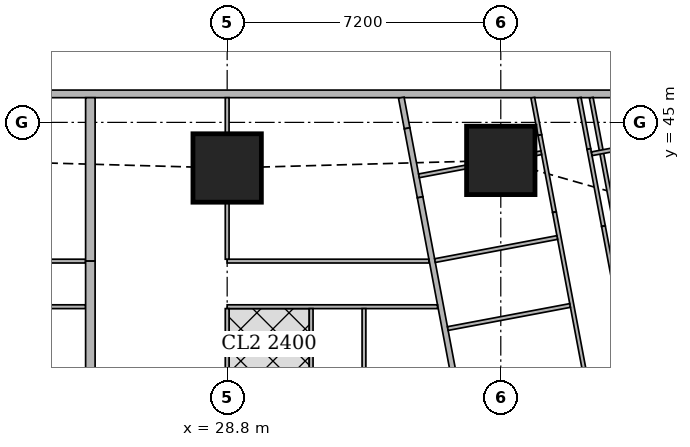
"""IFC4 building model, lengths in metres.
Left out: names, types, materials, properties, quantities, classifications, styles, units other than length and angle.
Written with IfcOpenShell. Run it as: python <this file> out.ifc"""

import sys

from ifc_helpers import new_model, si_unit, direction, frame, frame_2d, origin, origin_2d, place, context, subcontext, project, spatial, rectangle, extrude, element, fill, save


model = new_model("IFC4")
c1 = context("Model", 3, precision=1e-05, world=origin(), true_north=direction((0.0, 1.0)))
c2 = subcontext(c1, "Body", "Model", "MODEL_VIEW")
j1 = project(units=[si_unit("LENGTHUNIT", "METRE"), si_unit("PLANEANGLEUNIT", "RADIAN")], contexts=[c1])
p1 = place(None, origin())
s1 = spatial("IfcSite", under=j1, at=p1, CompositionType="ELEMENT")
p2 = place(p1, origin())
s2 = spatial("IfcBuilding", under=s1, at=p2, CompositionType="ELEMENT")
p3 = place(p2, frame((0.0, 0.0, 147.05)))
s3 = spatial("IfcBuildingStorey", under=s2, at=p3, CompositionType="ELEMENT", Elevation=147.05)
for number, where, z_axis, x_axis in (
    (1, (28.8, 43.8, 0.0), (0.0, 0.0, 1.0), (1.0, 0.0, 0.0)),
    (2, (36.0, 44.0, 0.0), (0.0, 0.0, 1.0), (1.0, 0.0, 0.0)),
):
    element("IfcColumn", number, at=place(p3, frame(where, z_axis=z_axis, x_axis=x_axis)), inside=s3, PredefinedType="COLUMN", context=c2, shape_type="SweptSolid", body=[
        extrude(rectangle(XDim=1.8, YDim=1.8, at=origin_2d()), origin(), (0.0, 0.0, 1.0), 3.75),
    ])
p4 = place(p3, frame((40.106, 45.75, 0.0), z_axis=(0.0, 0.0, 1.0), x_axis=(-1.0, 0.0, 0.0)))
e3 = element("IfcWall", 3, at=p4, inside=s3, PredefinedType="SOLIDWALL", context=c2, shape_type="SweptSolid", body=[
    extrude(rectangle(XDim=37.943, YDim=0.2, at=frame_2d((18.971, 0.0))), origin(), (0.0, 0.0, 1.0), 3.5),
])
p5 = place(p4, frame((8.606, 0.0, 0.9)))
e4 = element("IfcOpeningElement", 4, at=p5, cuts=e3, PredefinedType="OPENING", context=c2, shape_type="SweptSolid", body=[
    extrude(rectangle(XDim=1.8, YDim=1.5, at=frame_2d((0.9, 0.75))), frame((0.0, 0.11, 0.0), z_axis=(0.0, -1.0, 0.0), x_axis=(1.0, 0.0, 0.0)), (0.0, 0.0, 1.0), 0.22),
])
p6 = place(p4, frame((12.206, 0.0, 0.9)))
e5 = element("IfcOpeningElement", 5, at=p6, cuts=e3, PredefinedType="OPENING", context=c2, shape_type="SweptSolid", body=[
    extrude(rectangle(XDim=1.8, YDim=1.5, at=frame_2d((0.9, 0.75))), frame((0.0, 0.11, 0.0), z_axis=(0.0, -1.0, 0.0), x_axis=(1.0, 0.0, 0.0)), (0.0, 0.0, 1.0), 0.22),
])
p7 = place(p4, frame((15.806, 0.0, 0.9)))
e6 = element("IfcOpeningElement", 6, at=p7, cuts=e3, PredefinedType="OPENING", context=c2, shape_type="SweptSolid", body=[
    extrude(rectangle(XDim=1.8, YDim=1.5, at=frame_2d((0.9, 0.75))), frame((0.0, 0.11, 0.0), z_axis=(0.0, -1.0, 0.0), x_axis=(1.0, 0.0, 0.0)), (0.0, 0.0, 1.0), 0.22),
])
p8 = place(p4, frame((19.406, 0.0, 0.9)))
e7 = element("IfcOpeningElement", 7, at=p8, cuts=e3, PredefinedType="OPENING", context=c2, shape_type="SweptSolid", body=[
    extrude(rectangle(XDim=1.8, YDim=1.5, at=frame_2d((0.9, 0.75))), frame((0.0, 0.11, 0.0), z_axis=(0.0, -1.0, 0.0), x_axis=(1.0, 0.0, 0.0)), (0.0, 0.0, 1.0), 0.22),
])
p9 = place(p4, frame((23.006, 0.0, 0.9)))
e8 = element("IfcOpeningElement", 8, at=p9, cuts=e3, PredefinedType="OPENING", context=c2, shape_type="SweptSolid", body=[
    extrude(rectangle(XDim=1.8, YDim=1.5, at=frame_2d((0.9, 0.75))), frame((0.0, 0.11, 0.0), z_axis=(0.0, -1.0, 0.0), x_axis=(1.0, 0.0, 0.0)), (0.0, 0.0, 1.0), 0.22),
])
p10 = place(p4, frame((26.606, 0.0, 0.9)))
e9 = element("IfcOpeningElement", 9, at=p10, cuts=e3, PredefinedType="OPENING", context=c2, shape_type="SweptSolid", body=[
    extrude(rectangle(XDim=1.8, YDim=1.5, at=frame_2d((0.9, 0.75))), frame((0.0, 0.11, 0.0), z_axis=(0.0, -1.0, 0.0), x_axis=(1.0, 0.0, 0.0)), (0.0, 0.0, 1.0), 0.22),
])
p11 = place(p3, frame((33.382, 45.65, 0.0), z_axis=(0.0, 0.0, 1.0), x_axis=(0.185169202764, -0.982706653253, 0.0)))
e10 = element("IfcWall", 10, at=p11, inside=s3, PredefinedType="SOLIDWALL", context=c2, shape_type="SweptSolid", body=[
    extrude(rectangle(XDim=0.82, YDim=0.15, at=frame_2d((0.41, 0.0))), origin(), (0.0, 0.0, 1.0), 3.5),
])
p12 = place(p3, frame((33.534, 44.844, 0.0), z_axis=(0.0, 0.0, 1.0), x_axis=(0.185708872674, -0.982604811005, 0.0)))
e11 = element("IfcWall", 11, at=p12, inside=s3, PredefinedType="SOLIDWALL", context=c2, shape_type="SweptSolid", body=[
    extrude(rectangle(XDim=1.847, YDim=0.15, at=frame_2d((0.924, 0.0))), origin(), (0.0, 0.0, 1.0), 2.1),
])
p13 = place(p3, frame((33.877, 43.029, 0.0), z_axis=(0.0, 0.0, 1.0), x_axis=(0.185596841028, -0.98262597798, 0.0)))
e12 = element("IfcWall", 12, at=p13, inside=s3, PredefinedType="SOLIDWALL", context=c2, shape_type="SweptSolid", body=[
    extrude(rectangle(XDim=41.66, YDim=0.15, at=frame_2d((20.83, 0.0))), origin(), (0.0, 0.0, 1.0), 2.5),
])
p14 = place(p13, frame((12.57, 0.0, 0.0)))
e13 = element("IfcOpeningElement", 13, at=p14, cuts=e12, PredefinedType="OPENING", context=c2, shape_type="SweptSolid", body=[
    extrude(rectangle(XDim=1.0, YDim=2.1, at=frame_2d((0.5, 1.05))), frame((0.0, 0.085, 0.0), z_axis=(0.0, -1.0, 0.0), x_axis=(1.0, 0.0, 0.0)), (0.0, 0.0, 1.0), 0.17),
])
p15 = place(p13, frame((16.386, 0.0, 0.0)))
e14 = element("IfcOpeningElement", 14, at=p15, cuts=e12, PredefinedType="OPENING", context=c2, shape_type="SweptSolid", body=[
    extrude(rectangle(XDim=1.0, YDim=2.1, at=frame_2d((0.5, 1.05))), frame((0.0, 0.085, 0.0), z_axis=(0.0, -1.0, 0.0), x_axis=(1.0, 0.0, 0.0)), (0.0, 0.0, 1.0), 0.17),
])
p16 = place(p13, frame((31.166, 0.0, 0.0)))
e15 = element("IfcOpeningElement", 15, at=p16, cuts=e12, PredefinedType="OPENING", context=c2, shape_type="SweptSolid", body=[
    extrude(rectangle(XDim=1.0, YDim=2.1, at=frame_2d((0.5, 1.05))), frame((0.0, 0.085, 0.0), z_axis=(0.0, -1.0, 0.0), x_axis=(1.0, 0.0, 0.0)), (0.0, 0.0, 1.0), 0.17),
])
p17 = place(p3, frame((39.054, 42.085, 0.0), z_axis=(0.0, 0.0, 1.0), x_axis=(-0.185791584218, 0.982589175207, 0.0)))
e16 = element("IfcWall", 16, at=p17, inside=s3, PredefinedType="PARTITIONING", context=c2, shape_type="SweptSolid", body=[
    extrude(rectangle(XDim=3.628, YDim=0.1, at=frame_2d((1.814, 0.0))), origin(), (0.0, 0.0, 1.0), 2.1),
])
p18 = place(p3, frame((38.063, 45.65, 0.0), z_axis=(0.0, 0.0, 1.0), x_axis=(0.185456359766, -0.982652501458, 0.0)))
e17 = element("IfcWall", 17, at=p18, inside=s3, PredefinedType="PARTITIONING", context=c2, shape_type="SweptSolid", body=[
    extrude(rectangle(XDim=1.376, YDim=0.1, at=frame_2d((0.688, 0.0))), origin(), (0.0, 0.0, 1.0), 3.5),
])
p19 = place(p3, frame((38.318, 44.298, 0.0), z_axis=(0.0, 0.0, 1.0), x_axis=(0.185481135188, -0.982647825261, 0.0)))
e18 = element("IfcWall", 18, at=p19, inside=s3, PredefinedType="PARTITIONING", context=c2, shape_type="SweptSolid", body=[
    extrude(rectangle(XDim=2.064, YDim=0.1, at=frame_2d((1.032, 0.0))), origin(), (0.0, 0.0, 1.0), 2.1),
])
p20 = place(p3, frame((38.701, 42.27, 0.0), z_axis=(0.0, 0.0, 1.0), x_axis=(0.185634707842, -0.982618825, 0.0)))
e19 = element("IfcWall", 19, at=p20, inside=s3, PredefinedType="PARTITIONING", context=c2, shape_type="SweptSolid", body=[
    extrude(rectangle(XDim=9.47, YDim=0.1, at=frame_2d((4.735, 0.0))), origin(), (0.0, 0.0, 1.0), 3.5),
])
p21 = place(p20, frame((8.42, 0.0, 0.0)))
e20 = element("IfcOpeningElement", 20, at=p21, cuts=e19, PredefinedType="OPENING", context=c2, shape_type="SweptSolid", body=[
    extrude(rectangle(XDim=0.9, YDim=2.1, at=frame_2d((0.45, 1.05))), frame((0.0, 0.06, 0.0), z_axis=(0.0, -1.0, 0.0), x_axis=(1.0, 0.0, 0.0)), (0.0, 0.0, 1.0), 0.12),
])
p22 = place(p20, frame((4.444, 0.0, 0.0)))
e21 = element("IfcOpeningElement", 21, at=p22, cuts=e19, PredefinedType="OPENING", context=c2, shape_type="SweptSolid", body=[
    extrude(rectangle(XDim=0.9, YDim=2.1, at=frame_2d((0.45, 1.05))), frame((0.0, 0.06, 0.0), z_axis=(0.0, -1.0, 0.0), x_axis=(1.0, 0.0, 0.0)), (0.0, 0.0, 1.0), 0.12),
])
p23 = place(p3, frame((36.842, 45.65, 0.0), z_axis=(0.0, 0.0, 1.0), x_axis=(0.185789875365, -0.982589498322, 0.0)))
e22 = element("IfcWall", 22, at=p23, inside=s3, PredefinedType="PARTITIONING", context=c2, shape_type="SweptSolid", body=[
    extrude(rectangle(XDim=1.001, YDim=0.1, at=frame_2d((0.5, 0.0))), origin(), (0.0, 0.0, 1.0), 3.5),
])
p24 = place(p3, frame((37.028, 44.666, 0.0), z_axis=(0.0, 0.0, 1.0), x_axis=(0.185481135188, -0.982647825261, 0.0)))
e23 = element("IfcWall", 23, at=p24, inside=s3, PredefinedType="PARTITIONING", context=c2, shape_type="SweptSolid", body=[
    extrude(rectangle(XDim=2.064, YDim=0.1, at=frame_2d((1.032, 0.0))), origin(), (0.0, 0.0, 1.0), 2.1),
])
p25 = place(p3, frame((37.411, 42.638, 0.0), z_axis=(0.0, 0.0, 1.0), x_axis=(0.185485587071, -0.982646984928, 0.0)))
e24 = element("IfcWall", 24, at=p25, inside=s3, PredefinedType="PARTITIONING", context=c2, shape_type="SweptSolid", body=[
    extrude(rectangle(XDim=10.072, YDim=0.1, at=frame_2d((5.036, 0.0))), origin(), (0.0, 0.0, 1.0), 3.5),
])
p26 = place(p25, frame((8.567, 0.0, 0.0)))
e25 = element("IfcOpeningElement", 25, at=p26, cuts=e24, PredefinedType="OPENING", context=c2, shape_type="SweptSolid", body=[
    extrude(rectangle(XDim=0.9, YDim=2.1, at=frame_2d((0.45, 1.05))), frame((0.0, 0.06, 0.0), z_axis=(0.0, -1.0, 0.0), x_axis=(1.0, 0.0, 0.0)), (0.0, 0.0, 1.0), 0.12),
])
p27 = place(p25, frame((3.188, 0.0, 0.0)))
e26 = element("IfcOpeningElement", 26, at=p27, cuts=e24, PredefinedType="OPENING", context=c2, shape_type="SweptSolid", body=[
    extrude(rectangle(XDim=0.9, YDim=2.1, at=frame_2d((0.45, 1.05))), frame((0.0, 0.06, 0.0), z_axis=(0.0, -1.0, 0.0), x_axis=(1.0, 0.0, 0.0)), (0.0, 0.0, 1.0), 0.12),
])
p28 = place(p25, frame((1.129, 0.0, 0.0)))
e27 = element("IfcOpeningElement", 27, at=p28, cuts=e24, PredefinedType="OPENING", context=c2, shape_type="SweptSolid", body=[
    extrude(rectangle(XDim=0.9, YDim=2.1, at=frame_2d((0.45, 1.05))), frame((0.0, 0.06, 0.0), z_axis=(0.0, -1.0, 0.0), x_axis=(1.0, 0.0, 0.0)), (0.0, 0.0, 1.0), 0.12),
])
p29 = place(p25, frame((5.899, 0.0, 0.0)))
e28 = element("IfcOpeningElement", 28, at=p29, cuts=e24, PredefinedType="OPENING", context=c2, shape_type="SweptSolid", body=[
    extrude(rectangle(XDim=0.9, YDim=2.1, at=frame_2d((0.45, 1.05))), frame((0.0, 0.06, 0.0), z_axis=(0.0, -1.0, 0.0), x_axis=(1.0, 0.0, 0.0)), (0.0, 0.0, 1.0), 0.12),
])
p30 = place(p3, frame((41.968, 44.85, 0.0), z_axis=(0.0, 0.0, 1.0), x_axis=(-0.98258614234, -0.185807623311, 0.0)))
e29 = element("IfcWall", 29, at=p30, inside=s3, PredefinedType="PARTITIONING", context=c2, shape_type="SweptSolid", body=[
    extrude(rectangle(XDim=3.638, YDim=0.1, at=frame_2d((1.819, 0.0))), origin(), (0.0, 0.0, 1.0), 2.1),
])
p31 = place(p3, frame((37.065, 44.201, 0.0), z_axis=(0.0, 0.0, 1.0), x_axis=(-0.983168876381, -0.182699098288, 0.0)))
e30 = element("IfcWall", 30, at=p31, inside=s3, PredefinedType="PARTITIONING", context=c2, shape_type="SweptSolid", body=[
    extrude(rectangle(XDim=0.158, YDim=0.1, at=frame_2d((0.079, 0.0))), origin(), (0.0, 0.0, 1.0), 2.1),
])
p32 = place(p3, frame((35.09, 43.828, 0.0), z_axis=(0.0, 0.0, 1.0), x_axis=(-0.982758384778, -0.184894448668, 0.0)))
e31 = element("IfcWall", 31, at=p32, inside=s3, PredefinedType="PARTITIONING", context=c2, shape_type="SweptSolid", body=[
    extrude(rectangle(XDim=1.265, YDim=0.1, at=frame_2d((0.632, 0.0))), origin(), (0.0, 0.0, 1.0), 2.1),
])
p33 = place(p3, frame((37.823, 40.182, 0.0), z_axis=(0.0, 0.0, 1.0), x_axis=(-0.982664729897, -0.18539155487, 0.0)))
e32 = element("IfcWall", 32, at=p33, inside=s3, PredefinedType="PARTITIONING", context=c2, shape_type="SweptSolid", body=[
    extrude(rectangle(XDim=3.274, YDim=0.1, at=frame_2d((1.637, 0.0))), origin(), (0.0, 0.0, 1.0), 3.5),
])
p34 = place(p3, frame((37.486, 41.971, 0.0), z_axis=(0.0, 0.0, 1.0), x_axis=(-0.982620626894, -0.185625169636, 0.0)))
e33 = element("IfcWall", 33, at=p34, inside=s3, PredefinedType="PARTITIONING", context=c2, shape_type="SweptSolid", body=[
    extrude(rectangle(XDim=3.275, YDim=0.1, at=frame_2d((1.637, 0.0))), origin(), (0.0, 0.0, 1.0), 3.5),
])
p35 = place(p34, frame((1.201, 0.0, 0.0)))
e34 = element("IfcOpeningElement", 34, at=p35, cuts=e33, PredefinedType="OPENING", context=c2, shape_type="SweptSolid", body=[
    extrude(rectangle(XDim=0.9, YDim=2.1, at=frame_2d((0.45, 1.05))), frame((0.0, 0.06, 0.0), z_axis=(0.0, -1.0, 0.0), x_axis=(1.0, 0.0, 0.0)), (0.0, 0.0, 1.0), 0.12),
])
p36 = place(p3, frame((18.0, 41.35, 0.0), z_axis=(0.0, 0.0, 1.0), x_axis=(1.0, 0.0, 0.0)))
e35 = element("IfcWall", 35, at=p36, inside=s3, PredefinedType="PARTITIONING", context=c2, shape_type="SweptSolid", body=[
    extrude(rectangle(XDim=7.075, YDim=0.1, at=frame_2d((3.538, 0.0))), origin(), (0.0, 0.0, 1.0), 3.5),
])
p37 = place(p36, frame((0.2, 0.0, 0.0)))
e36 = element("IfcOpeningElement", 36, at=p37, cuts=e35, PredefinedType="OPENING", context=c2, shape_type="SweptSolid", body=[
    extrude(rectangle(XDim=0.9, YDim=2.1, at=frame_2d((0.45, 1.05))), frame((0.0, 0.06, 0.0), z_axis=(0.0, -1.0, 0.0), x_axis=(1.0, 0.0, 0.0)), (0.0, 0.0, 1.0), 0.12),
])
p38 = place(p36, frame((3.8, 0.0, 0.0)))
e37 = element("IfcOpeningElement", 37, at=p38, cuts=e35, PredefinedType="OPENING", context=c2, shape_type="SweptSolid", body=[
    extrude(rectangle(XDim=0.9, YDim=2.1, at=frame_2d((0.45, 1.05))), frame((0.0, 0.06, 0.0), z_axis=(0.0, -1.0, 0.0), x_axis=(1.0, 0.0, 0.0)), (0.0, 0.0, 1.0), 0.12),
])
p39 = place(p3, frame((18.0, 40.15, 0.0), z_axis=(0.0, 0.0, 1.0), x_axis=(1.0, 0.0, 0.0)))
e38 = element("IfcWall", 38, at=p39, inside=s3, PredefinedType="PARTITIONING", context=c2, shape_type="SweptSolid", body=[
    extrude(rectangle(XDim=7.075, YDim=0.1, at=frame_2d((3.538, 0.0))), origin(), (0.0, 0.0, 1.0), 3.5),
])
p40 = place(p39, frame((0.655, 0.0, 0.0)))
e39 = element("IfcOpeningElement", 39, at=p40, cuts=e38, PredefinedType="OPENING", context=c2, shape_type="SweptSolid", body=[
    extrude(rectangle(XDim=0.9, YDim=2.1, at=frame_2d((0.45, 1.05))), frame((0.0, 0.06, 0.0), z_axis=(0.0, -1.0, 0.0), x_axis=(1.0, 0.0, 0.0)), (0.0, 0.0, 1.0), 0.12),
])
p41 = place(p39, frame((3.95, 0.0, 0.0)))
e40 = element("IfcOpeningElement", 40, at=p41, cuts=e38, PredefinedType="OPENING", context=c2, shape_type="SweptSolid", body=[
    extrude(rectangle(XDim=0.9, YDim=2.1, at=frame_2d((0.45, 1.05))), frame((0.0, 0.06, 0.0), z_axis=(0.0, -1.0, 0.0), x_axis=(1.0, 0.0, 0.0)), (0.0, 0.0, 1.0), 0.12),
])
p42 = place(p39, frame((2.455, 0.0, 0.0)))
e41 = element("IfcOpeningElement", 41, at=p42, cuts=e38, PredefinedType="OPENING", context=c2, shape_type="SweptSolid", body=[
    extrude(rectangle(XDim=0.9, YDim=2.1, at=frame_2d((0.45, 1.05))), frame((0.0, 0.06, 0.0), z_axis=(0.0, -1.0, 0.0), x_axis=(1.0, 0.0, 0.0)), (0.0, 0.0, 1.0), 0.12),
])
p43 = place(p39, frame((5.75, 0.0, 0.0)))
e42 = element("IfcOpeningElement", 42, at=p43, cuts=e38, PredefinedType="OPENING", context=c2, shape_type="SweptSolid", body=[
    extrude(rectangle(XDim=0.9, YDim=2.1, at=frame_2d((0.45, 1.05))), frame((0.0, 0.06, 0.0), z_axis=(0.0, -1.0, 0.0), x_axis=(1.0, 0.0, 0.0)), (0.0, 0.0, 1.0), 0.12),
])
p44 = place(p3, frame((28.8, 41.35, 0.0), z_axis=(0.0, 0.0, 1.0), x_axis=(1.0, 0.0, 0.0)))
e43 = element("IfcWall", 43, at=p44, inside=s3, PredefinedType="PARTITIONING", context=c2, shape_type="SweptSolid", body=[
    extrude(rectangle(XDim=5.308, YDim=0.1, at=frame_2d((2.654, 0.0))), origin(), (0.0, 0.0, 1.0), 3.5),
])
p45 = place(p44, frame((0.2, 0.0, 0.0)))
e44 = element("IfcOpeningElement", 44, at=p45, cuts=e43, PredefinedType="OPENING", context=c2, shape_type="SweptSolid", body=[
    extrude(rectangle(XDim=0.9, YDim=2.1, at=frame_2d((0.45, 1.05))), frame((0.0, 0.06, 0.0), z_axis=(0.0, -1.0, 0.0), x_axis=(1.0, 0.0, 0.0)), (0.0, 0.0, 1.0), 0.12),
])
p46 = place(p3, frame((28.8, 40.15, 0.0), z_axis=(0.0, 0.0, 1.0), x_axis=(1.0, 0.0, 0.0)))
e45 = element("IfcWall", 45, at=p46, inside=s3, PredefinedType="PARTITIONING", context=c2, shape_type="SweptSolid", body=[
    extrude(rectangle(XDim=5.535, YDim=0.1, at=frame_2d((2.768, 0.0))), origin(), (0.0, 0.0, 1.0), 3.5),
])
p47 = place(p46, frame((0.655, 0.0, 0.0)))
e46 = element("IfcOpeningElement", 46, at=p47, cuts=e45, PredefinedType="OPENING", context=c2, shape_type="SweptSolid", body=[
    extrude(rectangle(XDim=0.9, YDim=2.1, at=frame_2d((0.45, 1.05))), frame((0.0, 0.06, 0.0), z_axis=(0.0, -1.0, 0.0), x_axis=(1.0, 0.0, 0.0)), (0.0, 0.0, 1.0), 0.12),
])
p48 = place(p46, frame((4.481, 0.0, 0.0)))
e47 = element("IfcOpeningElement", 47, at=p48, cuts=e45, PredefinedType="OPENING", context=c2, shape_type="SweptSolid", body=[
    extrude(rectangle(XDim=0.9, YDim=2.1, at=frame_2d((0.45, 1.05))), frame((0.0, 0.06, 0.0), z_axis=(0.0, -1.0, 0.0), x_axis=(1.0, 0.0, 0.0)), (0.0, 0.0, 1.0), 0.12),
])
p49 = place(p46, frame((2.455, 0.0, 0.0)))
e48 = element("IfcOpeningElement", 48, at=p49, cuts=e45, PredefinedType="OPENING", context=c2, shape_type="SweptSolid", body=[
    extrude(rectangle(XDim=0.9, YDim=2.1, at=frame_2d((0.45, 1.05))), frame((0.0, 0.06, 0.0), z_axis=(0.0, -1.0, 0.0), x_axis=(1.0, 0.0, 0.0)), (0.0, 0.0, 1.0), 0.12),
])
p50 = place(p3, frame((28.8, 41.4, 0.0), z_axis=(0.0, 0.0, 1.0), x_axis=(0.0, 1.0, 0.0)))
e49 = element("IfcWall", 49, at=p50, inside=s3, PredefinedType="PARTITIONING", context=c2, shape_type="SweptSolid", body=[
    extrude(rectangle(XDim=1.499, YDim=0.1, at=frame_2d((0.75, 0.0))), origin(), (0.0, 0.0, 1.0), 3.5),
])
p51 = place(p3, frame((28.8, 44.701, 0.0), z_axis=(0.0, 0.0, 1.0), x_axis=(0.0, 1.0, 0.0)))
e50 = element("IfcWall", 50, at=p51, inside=s3, PredefinedType="PARTITIONING", context=c2, shape_type="SweptSolid", body=[
    extrude(rectangle(XDim=0.949, YDim=0.1, at=frame_2d((0.475, 0.0))), origin(), (0.0, 0.0, 1.0), 3.5),
])
p52 = place(p3, frame((28.8, 38.251, 0.0), z_axis=(0.0, 0.0, 1.0), x_axis=(0.0, 1.0, 0.0)))
e51 = element("IfcWall", 51, at=p52, inside=s3, PredefinedType="PARTITIONING", context=c2, shape_type="SweptSolid", body=[
    extrude(rectangle(XDim=1.849, YDim=0.1, at=frame_2d((0.925, 0.0))), origin(), (0.0, 0.0, 1.0), 3.5),
])
for number, where, z_axis, x_axis in (
    (52, (32.4, 36.825, 0.0), (0.0, 0.0, 1.0), (0.0, 1.0, 0.0)),
    (53, (31.01, 36.825, 0.0), (0.0, 0.0, 1.0), (0.0, 1.0, 0.0)),
):
    element("IfcWall", number, at=place(p3, frame(where, z_axis=z_axis, x_axis=x_axis)), inside=s3, PredefinedType="PARTITIONING", context=c2, shape_type="SweptSolid", body=[
        extrude(rectangle(XDim=3.275, YDim=0.1, at=frame_2d((1.638, 0.0))), origin(), (0.0, 0.0, 1.0), 3.5),
    ])
p53 = place(p3, frame((25.2, 41.35, 0.0), z_axis=(0.0, 0.0, 1.0), x_axis=(0.0, 1.0, 0.0)))
e54 = element("IfcWall", 54, at=p53, inside=s3, PredefinedType="SOLIDWALL", context=c2, shape_type="SweptSolid", body=[
    extrude(rectangle(XDim=4.3, YDim=0.25, at=frame_2d((2.15, 0.0))), origin(), (0.0, 0.0, 1.0), 2.1),
])
p54 = place(p3, frame((25.2, 36.825, 0.0), z_axis=(0.0, 0.0, 1.0), x_axis=(0.0, 1.0, 0.0)))
e55 = element("IfcWall", 55, at=p54, inside=s3, PredefinedType="SOLIDWALL", context=c2, shape_type="SweptSolid", body=[
    extrude(rectangle(XDim=4.525, YDim=0.25, at=frame_2d((2.263, 0.0))), origin(), (0.0, 0.0, 1.0), 3.5),
])
p55 = place(p5, origin())
e56 = element("IfcWindow", 56, at=p55, inside=s3, PartitioningType="SINGLE_PANEL", PredefinedType="WINDOW", context=c2, shape_type="SweptSolid", body=[
    extrude(rectangle(XDim=1.8, YDim=1.5, at=frame_2d((0.9, 0.75))), frame((0.0, 0.03, 0.0), z_axis=(0.0, -1.0, 0.0), x_axis=(1.0, 0.0, 0.0)), (0.0, 0.0, 1.0), 0.06),
])
fill(e4, e56)
p56 = place(p6, origin())
e57 = element("IfcWindow", 57, at=p56, inside=s3, PartitioningType="SINGLE_PANEL", PredefinedType="WINDOW", context=c2, shape_type="SweptSolid", body=[
    extrude(rectangle(XDim=1.8, YDim=1.5, at=frame_2d((0.9, 0.75))), frame((0.0, 0.03, 0.0), z_axis=(0.0, -1.0, 0.0), x_axis=(1.0, 0.0, 0.0)), (0.0, 0.0, 1.0), 0.06),
])
fill(e5, e57)
p57 = place(p7, origin())
e58 = element("IfcWindow", 58, at=p57, inside=s3, PartitioningType="SINGLE_PANEL", PredefinedType="WINDOW", context=c2, shape_type="SweptSolid", body=[
    extrude(rectangle(XDim=1.8, YDim=1.5, at=frame_2d((0.9, 0.75))), frame((0.0, 0.03, 0.0), z_axis=(0.0, -1.0, 0.0), x_axis=(1.0, 0.0, 0.0)), (0.0, 0.0, 1.0), 0.06),
])
fill(e6, e58)
p58 = place(p27, origin())
e59 = element("IfcDoor", 59, at=p58, inside=s3, OperationType="SINGLE_SWING_RIGHT", PredefinedType="DOOR", context=c2, shape_type="SweptSolid", body=[
    extrude(rectangle(XDim=0.9, YDim=2.1, at=frame_2d((0.45, 1.05))), frame((0.0, 0.025, 0.0), z_axis=(0.0, -1.0, 0.0), x_axis=(1.0, 0.0, 0.0)), (0.0, 0.0, 1.0), 0.05),
])
fill(e26, e59)
p59 = place(p28, origin())
e60 = element("IfcDoor", 60, at=p59, inside=s3, OperationType="SINGLE_SWING_RIGHT", PredefinedType="DOOR", context=c2, shape_type="SweptSolid", body=[
    extrude(rectangle(XDim=0.9, YDim=2.1, at=frame_2d((0.45, 1.05))), frame((0.0, 0.025, 0.0), z_axis=(0.0, -1.0, 0.0), x_axis=(1.0, 0.0, 0.0)), (0.0, 0.0, 1.0), 0.05),
])
fill(e27, e60)
p60 = place(p35, origin())
e61 = element("IfcDoor", 61, at=p60, inside=s3, OperationType="SINGLE_SWING_RIGHT", PredefinedType="DOOR", context=c2, shape_type="SweptSolid", body=[
    extrude(rectangle(XDim=0.9, YDim=2.1, at=frame_2d((0.45, 1.05))), frame((0.0, 0.025, 0.0), z_axis=(0.0, -1.0, 0.0), x_axis=(1.0, 0.0, 0.0)), (0.0, 0.0, 1.0), 0.05),
])
fill(e34, e61)
p61 = place(p43, origin())
e62 = element("IfcDoor", 62, at=p61, inside=s3, OperationType="SINGLE_SWING_LEFT", PredefinedType="DOOR", context=c2, shape_type="SweptSolid", body=[
    extrude(rectangle(XDim=0.9, YDim=2.1, at=frame_2d((0.45, 1.05))), frame((0.0, 0.025, 0.0), z_axis=(0.0, -1.0, 0.0), x_axis=(1.0, 0.0, 0.0)), (0.0, 0.0, 1.0), 0.05),
])
fill(e42, e62)
p62 = place(p45, origin())
e63 = element("IfcDoor", 63, at=p62, inside=s3, OperationType="SINGLE_SWING_LEFT", PredefinedType="DOOR", context=c2, shape_type="SweptSolid", body=[
    extrude(rectangle(XDim=0.9, YDim=2.1, at=frame_2d((0.45, 1.05))), frame((0.0, 0.025, 0.0), z_axis=(0.0, -1.0, 0.0), x_axis=(1.0, 0.0, 0.0)), (0.0, 0.0, 1.0), 0.05),
])
fill(e44, e63)
p63 = place(p47, origin())
e64 = element("IfcDoor", 64, at=p63, inside=s3, OperationType="SINGLE_SWING_RIGHT", PredefinedType="DOOR", context=c2, shape_type="SweptSolid", body=[
    extrude(rectangle(XDim=0.9, YDim=2.1, at=frame_2d((0.45, 1.05))), frame((0.0, 0.025, 0.0), z_axis=(0.0, -1.0, 0.0), x_axis=(1.0, 0.0, 0.0)), (0.0, 0.0, 1.0), 0.05),
])
fill(e46, e64)
p64 = place(p48, origin())
e65 = element("IfcDoor", 65, at=p64, inside=s3, OperationType="SINGLE_SWING_LEFT", PredefinedType="DOOR", context=c2, shape_type="SweptSolid", body=[
    extrude(rectangle(XDim=0.9, YDim=2.1, at=frame_2d((0.45, 1.05))), frame((0.0, 0.025, 0.0), z_axis=(0.0, -1.0, 0.0), x_axis=(1.0, 0.0, 0.0)), (0.0, 0.0, 1.0), 0.05),
])
fill(e47, e65)
p65 = place(p49, origin())
e66 = element("IfcDoor", 66, at=p65, inside=s3, OperationType="SINGLE_SWING_RIGHT", PredefinedType="DOOR", context=c2, shape_type="SweptSolid", body=[
    extrude(rectangle(XDim=0.9, YDim=2.1, at=frame_2d((0.45, 1.05))), frame((0.0, 0.025, 0.0), z_axis=(0.0, -1.0, 0.0), x_axis=(1.0, 0.0, 0.0)), (0.0, 0.0, 1.0), 0.05),
])
fill(e48, e66)
save(model, sys.argv[1])
